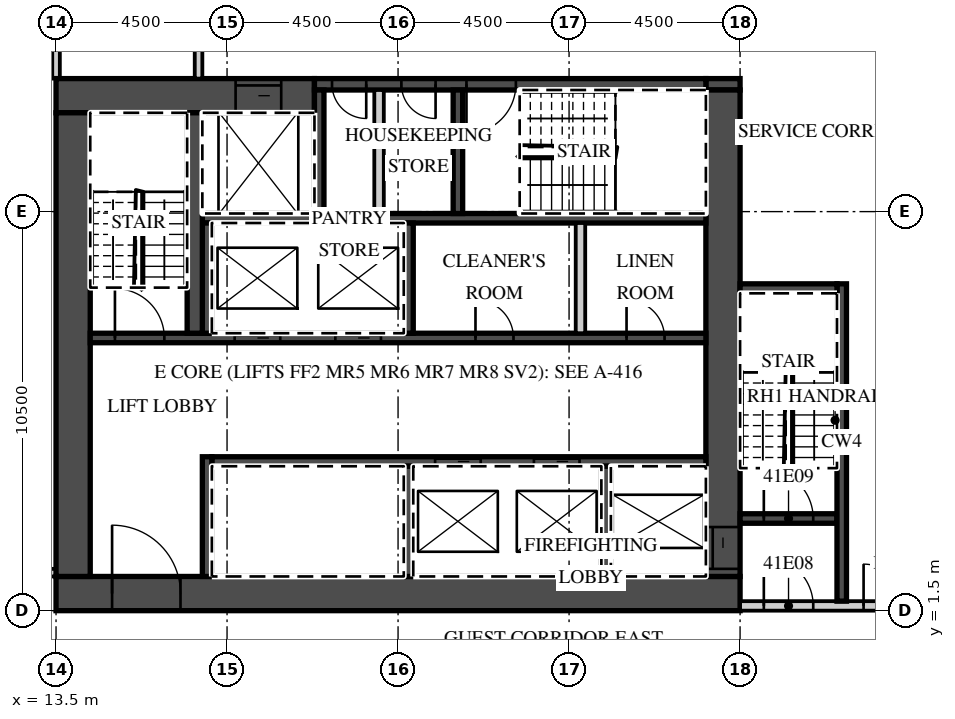
"""IFC4 building model, lengths in metres.
Left out: names, types, materials, properties, quantities, classifications, styles, units other than length and angle.
Written with IfcOpenShell. Run it as: python <this file> out.ifc"""

import sys

from ifc_helpers import new_model, si_unit, direction, frame, frame_2d, origin, place, context, subcontext, project, spatial, rectangle, extrude, element, fill, save


model = new_model("IFC4")
c1 = context("Model", 3, precision=1e-05, world=origin(), true_north=direction((0.0, 1.0)))
c2 = subcontext(c1, "Body", "Model", "MODEL_VIEW")
j1 = project(units=[si_unit("LENGTHUNIT", "METRE"), si_unit("PLANEANGLEUNIT", "RADIAN")], contexts=[c1])
p1 = place(None, origin())
s1 = spatial("IfcSite", under=j1, at=p1, CompositionType="ELEMENT")
p2 = place(p1, origin())
s2 = spatial("IfcBuilding", under=s1, at=p2, CompositionType="ELEMENT")
p3 = place(p2, frame((0.0, 0.0, 176.8)))
s3 = spatial("IfcBuildingStorey", under=s2, at=p3, CompositionType="ELEMENT", Elevation=176.8)
p4 = place(p3, frame((13.5, 15.5, 0.0), z_axis=(0.0, 0.0, 1.0), x_axis=(0.0, 1.0, 0.0)))
e1 = element("IfcWall", 1, at=p4, inside=s3, PredefinedType="PARTITIONING", context=c2, shape_type="SweptSolid", body=[
    extrude(rectangle(XDim=6.089, YDim=0.2, at=frame_2d((3.044, 0.0))), origin(), (0.0, 0.0, 1.0), 3.02),
])
p5 = place(p3, frame((-13.5, 2.5, 0.0), z_axis=(0.0, 0.0, 1.0), x_axis=(1.0, 0.0, 0.0)))
e2 = element("IfcWall", 2, at=p5, inside=s3, PredefinedType="PARTITIONING", context=c2, shape_type="SweptSolid", body=[
    extrude(rectangle(XDim=27.0, YDim=0.2, at=frame_2d((13.5, 0.0))), origin(), (0.0, 0.0, 1.0), 3.02),
])
p6 = place(p5, frame((0.575, 0.0, 0.0)))
e3 = element("IfcOpeningElement", 3, at=p6, cuts=e2, PredefinedType="OPENING", context=c2, shape_type="SweptSolid", body=[
    extrude(rectangle(XDim=1.0, YDim=2.1, at=frame_2d((0.5, 1.05))), frame((0.0, 0.11, 0.0), z_axis=(0.0, -1.0, 0.0), x_axis=(1.0, 0.0, 0.0)), (0.0, 0.0, 1.0), 0.22),
])
p7 = place(p5, frame((9.863, 0.0, 0.0)))
e4 = element("IfcOpeningElement", 4, at=p7, cuts=e2, PredefinedType="OPENING", context=c2, shape_type="SweptSolid", body=[
    extrude(rectangle(XDim=1.2, YDim=2.1, at=frame_2d((0.6, 1.05))), frame((0.0, 0.11, 0.0), z_axis=(0.0, -1.0, 0.0), x_axis=(1.0, 0.0, 0.0)), (0.0, 0.0, 1.0), 0.22),
])
p8 = place(p5, frame((15.938, 0.0, 0.0)))
e5 = element("IfcOpeningElement", 5, at=p8, cuts=e2, PredefinedType="OPENING", context=c2, shape_type="SweptSolid", body=[
    extrude(rectangle(XDim=1.2, YDim=2.1, at=frame_2d((0.6, 1.05))), frame((0.0, 0.11, 0.0), z_axis=(0.0, -1.0, 0.0), x_axis=(1.0, 0.0, 0.0)), (0.0, 0.0, 1.0), 0.22),
])
p9 = place(p5, frame((25.425, 0.0, 0.0)))
e6 = element("IfcOpeningElement", 6, at=p9, cuts=e2, PredefinedType="OPENING", context=c2, shape_type="SweptSolid", body=[
    extrude(rectangle(XDim=1.0, YDim=2.1, at=frame_2d((0.5, 1.05))), frame((0.0, 0.11, 0.0), z_axis=(0.0, -1.0, 0.0), x_axis=(1.0, 0.0, 0.0)), (0.0, 0.0, 1.0), 0.22),
])
p10 = place(p3, frame((13.5, 1.95, 0.0), z_axis=(0.0, 0.0, 1.0), x_axis=(1.0, 0.0, 0.0)))
e7 = element("IfcWall", 7, at=p10, inside=s3, PredefinedType="SHEAR", context=c2, shape_type="SweptSolid", body=[
    extrude(rectangle(XDim=18.0, YDim=0.9, at=frame_2d((9.0, 0.0))), origin(), (0.0, 0.0, 1.0), 3.02),
])
p11 = place(p10, frame((1.475, 0.0, 0.0)))
e8 = element("IfcOpeningElement", 8, at=p11, cuts=e7, PredefinedType="OPENING", context=c2, shape_type="SweptSolid", body=[
    extrude(rectangle(XDim=1.8, YDim=2.1, at=frame_2d((0.9, 1.05))), frame((0.0, 0.46, 0.0), z_axis=(0.0, -1.0, 0.0), x_axis=(1.0, 0.0, 0.0)), (0.0, 0.0, 1.0), 0.92),
])
p12 = place(p3, frame((13.5, 15.05, 0.0), z_axis=(0.0, 0.0, 1.0), x_axis=(1.0, 0.0, 0.0)))
e9 = element("IfcWall", 9, at=p12, inside=s3, PredefinedType="SHEAR", context=c2, shape_type="SweptSolid", body=[
    extrude(rectangle(XDim=6.8, YDim=0.9, at=frame_2d((3.4, 0.0))), origin(), (0.0, 0.0, 1.0), 3.02),
])
p13 = place(p12, frame((4.725, 0.0, 0.0)))
e10 = element("IfcOpeningElement", 10, at=p13, cuts=e9, PredefinedType="OPENING", context=c2, shape_type="SweptSolid", body=[
    extrude(rectangle(XDim=1.2, YDim=2.1, at=frame_2d((0.6, 1.05))), frame((0.0, 0.46, 0.0), z_axis=(0.0, -1.0, 0.0), x_axis=(1.0, 0.0, 0.0)), (0.0, 0.0, 1.0), 0.92),
])
p14 = place(p3, frame((30.6, 15.35, 0.0), z_axis=(0.0, 0.0, 1.0), x_axis=(1.0, 0.0, 0.0)))
e11 = element("IfcWall", 11, at=p14, inside=s3, PredefinedType="SHEAR", context=c2, shape_type="SweptSolid", body=[
    extrude(rectangle(XDim=0.9, YDim=0.3, at=frame_2d((0.45, 0.0))), origin(), (0.0, 0.0, 1.0), 3.02),
])
p15 = place(p3, frame((20.3, 15.35, 0.0), z_axis=(0.0, 0.0, 1.0), x_axis=(1.0, 0.0, 0.0)))
e12 = element("IfcWall", 12, at=p15, inside=s3, PredefinedType="SHEAR", context=c2, shape_type="SweptSolid", body=[
    extrude(rectangle(XDim=10.3, YDim=0.3, at=frame_2d((5.15, 0.0))), origin(), (0.0, 0.0, 1.0), 3.02),
])
p16 = place(p15, frame((4.0, 0.0, 0.0)))
e13 = element("IfcOpeningElement", 13, at=p16, cuts=e12, PredefinedType="OPENING", context=c2, shape_type="SweptSolid", body=[
    extrude(rectangle(XDim=1.3, YDim=2.1, at=frame_2d((0.65, 1.05))), frame((0.0, 0.16, 0.0), z_axis=(0.0, -1.0, 0.0), x_axis=(1.0, 0.0, 0.0)), (0.0, 0.0, 1.0), 0.32),
])
p17 = place(p15, frame((2.288, 0.0, 0.0)))
e14 = element("IfcOpeningElement", 14, at=p17, cuts=e12, PredefinedType="OPENING", context=c2, shape_type="SweptSolid", body=[
    extrude(rectangle(XDim=0.9, YDim=2.1, at=frame_2d((0.45, 1.05))), frame((0.0, 0.16, 0.0), z_axis=(0.0, -1.0, 0.0), x_axis=(1.0, 0.0, 0.0)), (0.0, 0.0, 1.0), 0.32),
])
p18 = place(p15, frame((0.462, 0.0, 0.0)))
e15 = element("IfcOpeningElement", 15, at=p18, cuts=e12, PredefinedType="OPENING", context=c2, shape_type="SweptSolid", body=[
    extrude(rectangle(XDim=0.9, YDim=2.1, at=frame_2d((0.45, 1.05))), frame((0.0, 0.16, 0.0), z_axis=(0.0, -1.0, 0.0), x_axis=(1.0, 0.0, 0.0)), (0.0, 0.0, 1.0), 0.32),
])
p19 = place(p3, frame((31.05, 2.4, 0.0), z_axis=(0.0, 0.0, 1.0), x_axis=(0.0, 1.0, 0.0)))
e16 = element("IfcWall", 16, at=p19, inside=s3, PredefinedType="SHEAR", context=c2, shape_type="SweptSolid", body=[
    extrude(rectangle(XDim=12.8, YDim=0.9, at=frame_2d((6.4, 0.0))), origin(), (0.0, 0.0, 1.0), 3.02),
])
p20 = place(p19, frame((0.2, 0.0, 0.0)))
e17 = element("IfcOpeningElement", 17, at=p20, cuts=e16, PredefinedType="OPENING", context=c2, shape_type="SweptSolid", body=[
    extrude(rectangle(XDim=1.1, YDim=2.1, at=frame_2d((0.55, 1.05))), frame((0.0, 0.46, 0.0), z_axis=(0.0, -1.0, 0.0), x_axis=(1.0, 0.0, 0.0)), (0.0, 0.0, 1.0), 0.92),
])
p21 = place(p3, frame((13.95, 2.4, 0.0), z_axis=(0.0, 0.0, 1.0), x_axis=(0.0, 1.0, 0.0)))
e18 = element("IfcWall", 18, at=p21, inside=s3, PredefinedType="SHEAR", context=c2, shape_type="SweptSolid", body=[
    extrude(rectangle(XDim=12.2, YDim=0.9, at=frame_2d((6.1, 0.0))), origin(), (0.0, 0.0, 1.0), 3.02),
])
p22 = place(p3, frame((17.6, 5.425, 0.0), z_axis=(0.0, 0.0, 1.0), x_axis=(1.0, 0.0, 0.0)))
e19 = element("IfcWall", 19, at=p22, inside=s3, PredefinedType="SHEAR", context=c2, shape_type="SweptSolid", body=[
    extrude(rectangle(XDim=13.0, YDim=0.25, at=frame_2d((6.5, 0.0))), origin(), (0.0, 0.0, 1.0), 3.02),
])
p23 = place(p22, frame((8.475, 0.0, 0.0)))
e20 = element("IfcOpeningElement", 20, at=p23, cuts=e19, PredefinedType="OPENING", context=c2, shape_type="SweptSolid", body=[
    extrude(rectangle(XDim=1.2, YDim=2.1, at=frame_2d((0.6, 1.05))), frame((0.0, 0.135, 0.0), z_axis=(0.0, -1.0, 0.0), x_axis=(1.0, 0.0, 0.0)), (0.0, 0.0, 1.0), 0.27),
])
p24 = place(p22, frame((5.875, 0.0, 0.0)))
e21 = element("IfcOpeningElement", 21, at=p24, cuts=e19, PredefinedType="OPENING", context=c2, shape_type="SweptSolid", body=[
    extrude(rectangle(XDim=1.2, YDim=2.1, at=frame_2d((0.6, 1.05))), frame((0.0, 0.135, 0.0), z_axis=(0.0, -1.0, 0.0), x_axis=(1.0, 0.0, 0.0)), (0.0, 0.0, 1.0), 0.27),
])
p25 = place(p3, frame((17.475, 2.4, 0.0), z_axis=(0.0, 0.0, 1.0), x_axis=(0.0, 1.0, 0.0)))
e22 = element("IfcWall", 22, at=p25, inside=s3, PredefinedType="SHEAR", context=c2, shape_type="SweptSolid", body=[
    extrude(rectangle(XDim=3.15, YDim=0.25, at=frame_2d((1.575, 0.0))), origin(), (0.0, 0.0, 1.0), 3.02),
])
for number, where, z_axis, x_axis in (
    (23, (27.975, 2.4, 0.0), (0.0, 0.0, 1.0), (0.0, 1.0, 0.0)),
    (24, (22.775, 2.4, 0.0), (0.0, 0.0, 1.0), (0.0, 1.0, 0.0)),
):
    element("IfcWall", number, at=place(p3, frame(where, z_axis=z_axis, x_axis=x_axis)), inside=s3, PredefinedType="SHEAR", context=c2, shape_type="SweptSolid", body=[
        extrude(rectangle(XDim=2.9, YDim=0.25, at=frame_2d((1.45, 0.0))), origin(), (0.0, 0.0, 1.0), 3.02),
    ])
p26 = place(p3, frame((14.4, 8.675, 0.0), z_axis=(0.0, 0.0, 1.0), x_axis=(1.0, 0.0, 0.0)))
e25 = element("IfcWall", 25, at=p26, inside=s3, PredefinedType="SHEAR", context=c2, shape_type="SweptSolid", body=[
    extrude(rectangle(XDim=16.2, YDim=0.25, at=frame_2d((8.1, 0.0))), origin(), (0.0, 0.0, 1.0), 3.02),
])
p27 = place(p26, frame((6.45, 0.0, 0.0)))
e26 = element("IfcOpeningElement", 26, at=p27, cuts=e25, PredefinedType="OPENING", context=c2, shape_type="SweptSolid", body=[
    extrude(rectangle(XDim=1.2, YDim=2.1, at=frame_2d((0.6, 1.05))), frame((0.0, 0.135, 0.0), z_axis=(0.0, -1.0, 0.0), x_axis=(1.0, 0.0, 0.0)), (0.0, 0.0, 1.0), 0.27),
])
p28 = place(p26, frame((3.8, 0.0, 0.0)))
e27 = element("IfcOpeningElement", 27, at=p28, cuts=e25, PredefinedType="OPENING", context=c2, shape_type="SweptSolid", body=[
    extrude(rectangle(XDim=1.2, YDim=2.1, at=frame_2d((0.6, 1.05))), frame((0.0, 0.135, 0.0), z_axis=(0.0, -1.0, 0.0), x_axis=(1.0, 0.0, 0.0)), (0.0, 0.0, 1.0), 0.27),
])
p29 = place(p26, frame((0.65, 0.0, 0.0)))
e28 = element("IfcOpeningElement", 28, at=p29, cuts=e25, PredefinedType="OPENING", context=c2, shape_type="SweptSolid", body=[
    extrude(rectangle(XDim=1.3, YDim=2.1, at=frame_2d((0.65, 1.05))), frame((0.0, 0.135, 0.0), z_axis=(0.0, -1.0, 0.0), x_axis=(1.0, 0.0, 0.0)), (0.0, 0.0, 1.0), 0.27),
])
p30 = place(p26, frame((14.113, 0.0, 0.0)))
e29 = element("IfcOpeningElement", 29, at=p30, cuts=e25, PredefinedType="OPENING", context=c2, shape_type="SweptSolid", body=[
    extrude(rectangle(XDim=1.0, YDim=2.1, at=frame_2d((0.5, 1.05))), frame((0.0, 0.135, 0.0), z_axis=(0.0, -1.0, 0.0), x_axis=(1.0, 0.0, 0.0)), (0.0, 0.0, 1.0), 0.27),
])
p31 = place(p26, frame((10.137, 0.0, 0.0)))
e30 = element("IfcOpeningElement", 30, at=p31, cuts=e25, PredefinedType="OPENING", context=c2, shape_type="SweptSolid", body=[
    extrude(rectangle(XDim=1.0, YDim=2.1, at=frame_2d((0.5, 1.05))), frame((0.0, 0.135, 0.0), z_axis=(0.0, -1.0, 0.0), x_axis=(1.0, 0.0, 0.0)), (0.0, 0.0, 1.0), 0.27),
])
p32 = place(p3, frame((17.35, 11.825, 0.0), z_axis=(0.0, 0.0, 1.0), x_axis=(1.0, 0.0, 0.0)))
e31 = element("IfcWall", 31, at=p32, inside=s3, PredefinedType="SHEAR", context=c2, shape_type="SweptSolid", body=[
    extrude(rectangle(XDim=13.25, YDim=0.25, at=frame_2d((6.625, 0.0))), origin(), (0.0, 0.0, 1.0), 3.02),
])
for number, where, z_axis, x_axis in (
    (32, (17.475, 8.8, 0.0), (0.0, 0.0, 1.0), (0.0, 1.0, 0.0)),
    (33, (22.775, 8.8, 0.0), (0.0, 0.0, 1.0), (0.0, 1.0, 0.0)),
):
    element("IfcWall", number, at=place(p3, frame(where, z_axis=z_axis, x_axis=x_axis)), inside=s3, PredefinedType="SHEAR", context=c2, shape_type="SweptSolid", body=[
        extrude(rectangle(XDim=2.9, YDim=0.25, at=frame_2d((1.45, 0.0))), origin(), (0.0, 0.0, 1.0), 3.02),
    ])
p33 = place(p3, frame((27.3, 8.8, 0.0), z_axis=(0.0, 0.0, 1.0), x_axis=(0.0, 1.0, 0.0)))
e34 = element("IfcWall", 34, at=p33, inside=s3, PredefinedType="PARTITIONING", context=c2, shape_type="SweptSolid", body=[
    extrude(rectangle(XDim=2.9, YDim=0.25, at=frame_2d((1.45, 0.0))), origin(), (0.0, 0.0, 1.0), 3.02),
])
p34 = place(p3, frame((17.15, 8.8, 0.0), z_axis=(0.0, 0.0, 1.0), x_axis=(0.0, 1.0, 0.0)))
e35 = element("IfcWall", 35, at=p34, inside=s3, PredefinedType="SHEAR", context=c2, shape_type="SweptSolid", body=[
    extrude(rectangle(XDim=5.8, YDim=0.4, at=frame_2d((2.9, 0.0))), origin(), (0.0, 0.0, 1.0), 3.02),
])
for number, where, z_axis, x_axis in (
    (36, (20.425, 11.95, 0.0), (0.0, 0.0, 1.0), (0.0, 1.0, 0.0)),
    (37, (24.075, 11.95, 0.0), (0.0, 0.0, 1.0), (0.0, 1.0, 0.0)),
):
    element("IfcWall", number, at=place(p3, frame(where, z_axis=z_axis, x_axis=x_axis)), inside=s3, PredefinedType="SHEAR", context=c2, shape_type="SweptSolid", body=[
        extrude(rectangle(XDim=3.25, YDim=0.25, at=frame_2d((1.625, 0.0))), origin(), (0.0, 0.0, 1.0), 3.02),
    ])
p35 = place(p3, frame((22.0, 11.95, 0.0), z_axis=(0.0, 0.0, 1.0), x_axis=(0.0, 1.0, 0.0)))
e38 = element("IfcWall", 38, at=p35, inside=s3, PredefinedType="PARTITIONING", context=c2, shape_type="SweptSolid", body=[
    extrude(rectangle(XDim=3.25, YDim=0.25, at=frame_2d((1.625, 0.0))), origin(), (0.0, 0.0, 1.0), 3.02),
])
p36 = place(p3, frame((31.5, 1.625, 0.0), z_axis=(0.0, 0.0, 1.0), x_axis=(1.0, 0.0, 0.0)))
e39 = element("IfcWall", 39, at=p36, inside=s3, PredefinedType="PARTITIONING", context=c2, shape_type="SweptSolid", body=[
    extrude(rectangle(XDim=8.035, YDim=0.25, at=frame_2d((4.018, 0.0))), origin(), (0.0, 0.0, 1.0), 3.02),
])
p37 = place(p36, frame((0.625, 0.0, 0.0)))
e40 = element("IfcOpeningElement", 40, at=p37, cuts=e39, PredefinedType="OPENING", context=c2, shape_type="SweptSolid", body=[
    extrude(rectangle(XDim=1.3, YDim=2.1, at=frame_2d((0.65, 1.05))), frame((0.0, 0.135, 0.0), z_axis=(0.0, -1.0, 0.0), x_axis=(1.0, 0.0, 0.0)), (0.0, 0.0, 1.0), 0.27),
])
p38 = place(p36, frame((3.25, 0.0, 0.0)))
e41 = element("IfcOpeningElement", 41, at=p38, cuts=e39, PredefinedType="OPENING", context=c2, shape_type="SweptSolid", body=[
    extrude(rectangle(XDim=1.1, YDim=2.1, at=frame_2d((0.55, 1.05))), frame((0.0, 0.135, 0.0), z_axis=(0.0, -1.0, 0.0), x_axis=(1.0, 0.0, 0.0)), (0.0, 0.0, 1.0), 0.27),
])
p39 = place(p3, frame((31.5, 3.925, 0.0), z_axis=(0.0, 0.0, 1.0), x_axis=(1.0, 0.0, 0.0)))
e42 = element("IfcWall", 42, at=p39, inside=s3, PredefinedType="SHEAR", context=c2, shape_type="SweptSolid", body=[
    extrude(rectangle(XDim=2.55, YDim=0.25, at=frame_2d((1.275, 0.0))), origin(), (0.0, 0.0, 1.0), 3.02),
])
p40 = place(p39, frame((0.625, 0.0, 0.0)))
e43 = element("IfcOpeningElement", 43, at=p40, cuts=e42, PredefinedType="OPENING", context=c2, shape_type="SweptSolid", body=[
    extrude(rectangle(XDim=1.3, YDim=2.1, at=frame_2d((0.65, 1.05))), frame((0.0, 0.135, 0.0), z_axis=(0.0, -1.0, 0.0), x_axis=(1.0, 0.0, 0.0)), (0.0, 0.0, 1.0), 0.27),
])
p41 = place(p3, frame((34.175, 1.75, 0.0), z_axis=(0.0, 0.0, 1.0), x_axis=(0.0, 1.0, 0.0)))
e44 = element("IfcWall", 44, at=p41, inside=s3, PredefinedType="SHEAR", context=c2, shape_type="SweptSolid", body=[
    extrude(rectangle(XDim=8.35, YDim=0.25, at=frame_2d((4.175, 0.0))), origin(), (0.0, 0.0, 1.0), 3.02),
])
p42 = place(p3, frame((31.5, 9.975, 0.0), z_axis=(0.0, 0.0, 1.0), x_axis=(1.0, 0.0, 0.0)))
e45 = element("IfcWall", 45, at=p42, inside=s3, PredefinedType="SHEAR", context=c2, shape_type="SweptSolid", body=[
    extrude(rectangle(XDim=2.55, YDim=0.25, at=frame_2d((1.275, 0.0))), origin(), (0.0, 0.0, 1.0), 3.02),
])
p43 = place(p3, frame((17.25, 15.5, 0.0), z_axis=(0.0, 0.0, 1.0), x_axis=(0.0, 1.0, 0.0)))
e46 = element("IfcWall", 46, at=p43, inside=s3, PredefinedType="PARTITIONING", context=c2, shape_type="SweptSolid", body=[
    extrude(rectangle(XDim=2.2, YDim=0.2, at=frame_2d((1.1, 0.0))), origin(), (0.0, 0.0, 1.0), 3.02),
])
p44 = place(p27, origin())
e47 = element("IfcDoor", 47, at=p44, inside=s3, OperationType="SLIDING_TO_LEFT", PredefinedType="DOOR", context=c2, shape_type="SweptSolid", body=[
    extrude(rectangle(XDim=1.2, YDim=2.1, at=frame_2d((0.6, 1.05))), frame((0.0, 0.025, 0.0), z_axis=(0.0, -1.0, 0.0), x_axis=(1.0, 0.0, 0.0)), (0.0, 0.0, 1.0), 0.05),
])
fill(e26, e47)
p45 = place(p28, origin())
e48 = element("IfcDoor", 48, at=p45, inside=s3, OperationType="SLIDING_TO_RIGHT", PredefinedType="DOOR", context=c2, shape_type="SweptSolid", body=[
    extrude(rectangle(XDim=1.2, YDim=2.1, at=frame_2d((0.6, 1.05))), frame((0.0, 0.025, 0.0), z_axis=(0.0, -1.0, 0.0), x_axis=(1.0, 0.0, 0.0)), (0.0, 0.0, 1.0), 0.05),
])
fill(e27, e48)
p46 = place(p23, origin())
e49 = element("IfcDoor", 49, at=p46, inside=s3, OperationType="SLIDING_TO_LEFT", PredefinedType="DOOR", context=c2, shape_type="SweptSolid", body=[
    extrude(rectangle(XDim=1.2, YDim=2.1, at=frame_2d((0.6, 1.05))), frame((0.0, 0.025, 0.0), z_axis=(0.0, -1.0, 0.0), x_axis=(1.0, 0.0, 0.0)), (0.0, 0.0, 1.0), 0.05),
])
fill(e20, e49)
p47 = place(p24, origin())
e50 = element("IfcDoor", 50, at=p47, inside=s3, OperationType="SLIDING_TO_RIGHT", PredefinedType="DOOR", context=c2, shape_type="SweptSolid", body=[
    extrude(rectangle(XDim=1.2, YDim=2.1, at=frame_2d((0.6, 1.05))), frame((0.0, 0.025, 0.0), z_axis=(0.0, -1.0, 0.0), x_axis=(1.0, 0.0, 0.0)), (0.0, 0.0, 1.0), 0.05),
])
fill(e21, e50)
p48 = place(p13, origin())
e51 = element("IfcDoor", 51, at=p48, inside=s3, OperationType="SLIDING_TO_LEFT", PredefinedType="DOOR", context=c2, shape_type="SweptSolid", body=[
    extrude(rectangle(XDim=1.2, YDim=2.1, at=frame_2d((0.6, 1.05))), frame((0.0, 0.025, 0.0), z_axis=(0.0, -1.0, 0.0), x_axis=(1.0, 0.0, 0.0)), (0.0, 0.0, 1.0), 0.05),
])
fill(e10, e51)
p49 = place(p20, origin())
e52 = element("IfcDoor", 52, at=p49, inside=s3, OperationType="SLIDING_TO_LEFT", PredefinedType="DOOR", context=c2, shape_type="SweptSolid", body=[
    extrude(rectangle(XDim=1.1, YDim=2.1, at=frame_2d((0.55, 1.05))), frame((0.0, 0.025, 0.0), z_axis=(0.0, -1.0, 0.0), x_axis=(1.0, 0.0, 0.0)), (0.0, 0.0, 1.0), 0.05),
])
fill(e17, e52)
p50 = place(p11, origin())
e53 = element("IfcDoor", 53, at=p50, inside=s3, OperationType="DOUBLE_DOOR_DOUBLE_SWING", PredefinedType="DOOR", context=c2, shape_type="SweptSolid", body=[
    extrude(rectangle(XDim=1.8, YDim=2.1, at=frame_2d((0.9, 1.05))), frame((0.0, 0.025, 0.0), z_axis=(0.0, -1.0, 0.0), x_axis=(1.0, 0.0, 0.0)), (0.0, 0.0, 1.0), 0.05),
])
fill(e8, e53)
p51 = place(p37, origin())
e54 = element("IfcDoor", 54, at=p51, inside=s3, OperationType="SINGLE_SWING_LEFT", PredefinedType="DOOR", context=c2, shape_type="SweptSolid", body=[
    extrude(rectangle(XDim=1.3, YDim=2.1, at=frame_2d((0.65, 1.05))), frame((0.0, 0.025, 0.0), z_axis=(0.0, -1.0, 0.0), x_axis=(1.0, 0.0, 0.0)), (0.0, 0.0, 1.0), 0.05),
])
fill(e40, e54)
p52 = place(p40, origin())
e55 = element("IfcDoor", 55, at=p52, inside=s3, OperationType="SINGLE_SWING_LEFT", PredefinedType="DOOR", context=c2, shape_type="SweptSolid", body=[
    extrude(rectangle(XDim=1.3, YDim=2.1, at=frame_2d((0.65, 1.05))), frame((0.0, 0.025, 0.0), z_axis=(0.0, -1.0, 0.0), x_axis=(1.0, 0.0, 0.0)), (0.0, 0.0, 1.0), 0.05),
])
fill(e43, e55)
p53 = place(p38, origin())
e56 = element("IfcDoor", 56, at=p53, inside=s3, OperationType="SINGLE_SWING_LEFT", PredefinedType="DOOR", context=c2, shape_type="SweptSolid", body=[
    extrude(rectangle(XDim=1.1, YDim=2.1, at=frame_2d((0.55, 1.05))), frame((0.0, 0.025, 0.0), z_axis=(0.0, -1.0, 0.0), x_axis=(1.0, 0.0, 0.0)), (0.0, 0.0, 1.0), 0.05),
])
fill(e41, e56)
p54 = place(p29, origin())
e57 = element("IfcDoor", 57, at=p54, inside=s3, OperationType="SINGLE_SWING_LEFT", PredefinedType="DOOR", context=c2, shape_type="SweptSolid", body=[
    extrude(rectangle(XDim=1.3, YDim=2.1, at=frame_2d((0.65, 1.05))), frame((0.0, 0.025, 0.0), z_axis=(0.0, -1.0, 0.0), x_axis=(1.0, 0.0, 0.0)), (0.0, 0.0, 1.0), 0.05),
])
fill(e28, e57)
p55 = place(p16, origin())
e58 = element("IfcDoor", 58, at=p55, inside=s3, OperationType="SINGLE_SWING_LEFT", PredefinedType="DOOR", context=c2, shape_type="SweptSolid", body=[
    extrude(rectangle(XDim=1.3, YDim=2.1, at=frame_2d((0.65, 1.05))), frame((0.0, 0.025, 0.0), z_axis=(0.0, -1.0, 0.0), x_axis=(1.0, 0.0, 0.0)), (0.0, 0.0, 1.0), 0.05),
])
fill(e13, e58)
p56 = place(p17, origin())
e59 = element("IfcDoor", 59, at=p56, inside=s3, OperationType="SINGLE_SWING_RIGHT", PredefinedType="DOOR", context=c2, shape_type="SweptSolid", body=[
    extrude(rectangle(XDim=0.9, YDim=2.1, at=frame_2d((0.45, 1.05))), frame((0.0, 0.025, 0.0), z_axis=(0.0, -1.0, 0.0), x_axis=(1.0, 0.0, 0.0)), (0.0, 0.0, 1.0), 0.05),
])
fill(e14, e59)
p57 = place(p18, origin())
e60 = element("IfcDoor", 60, at=p57, inside=s3, OperationType="SINGLE_SWING_RIGHT", PredefinedType="DOOR", context=c2, shape_type="SweptSolid", body=[
    extrude(rectangle(XDim=0.9, YDim=2.1, at=frame_2d((0.45, 1.05))), frame((0.0, 0.025, 0.0), z_axis=(0.0, -1.0, 0.0), x_axis=(1.0, 0.0, 0.0)), (0.0, 0.0, 1.0), 0.05),
])
fill(e15, e60)
p58 = place(p30, origin())
e61 = element("IfcDoor", 61, at=p58, inside=s3, OperationType="SINGLE_SWING_LEFT", PredefinedType="DOOR", context=c2, shape_type="SweptSolid", body=[
    extrude(rectangle(XDim=1.0, YDim=2.1, at=frame_2d((0.5, 1.05))), frame((0.0, 0.025, 0.0), z_axis=(0.0, -1.0, 0.0), x_axis=(1.0, 0.0, 0.0)), (0.0, 0.0, 1.0), 0.05),
])
fill(e29, e61)
p59 = place(p31, origin())
e62 = element("IfcDoor", 62, at=p59, inside=s3, OperationType="SINGLE_SWING_LEFT", PredefinedType="DOOR", context=c2, shape_type="SweptSolid", body=[
    extrude(rectangle(XDim=1.0, YDim=2.1, at=frame_2d((0.5, 1.05))), frame((0.0, 0.025, 0.0), z_axis=(0.0, -1.0, 0.0), x_axis=(1.0, 0.0, 0.0)), (0.0, 0.0, 1.0), 0.05),
])
fill(e30, e62)
save(model, sys.argv[1])
